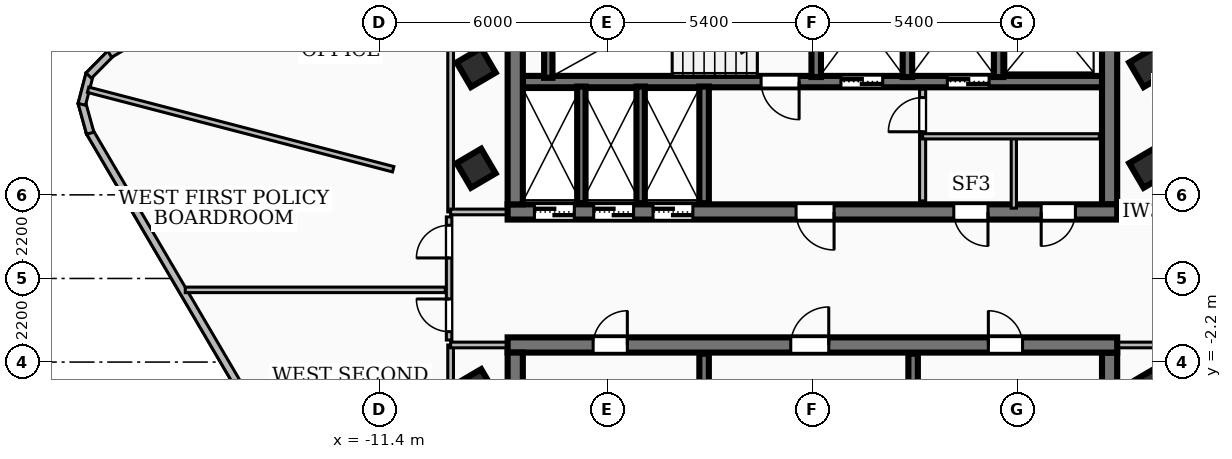
"""IFC4 building model, lengths in metres.
Left out: names, types, materials, properties, quantities, classifications, styles, units other than length and angle.
Written with IfcOpenShell. Run it as: python <this file> out.ifc"""

import sys

from ifc_helpers import new_model, si_unit, direction, frame, frame_2d, origin, origin_2d, place, context, subcontext, project, spatial, rectangle, extrude, element, fill, save


model = new_model("IFC4")
c1 = context("Model", 3, precision=1e-05, world=origin(), true_north=direction((0.0, 1.0)))
c2 = subcontext(c1, "Body", "Model", "MODEL_VIEW")
j1 = project(units=[si_unit("LENGTHUNIT", "METRE"), si_unit("PLANEANGLEUNIT", "RADIAN")], contexts=[c1])
p1 = place(None, origin())
s1 = spatial("IfcSite", under=j1, at=p1, CompositionType="ELEMENT")
p2 = place(p1, origin())
s2 = spatial("IfcBuilding", under=s1, at=p2, CompositionType="ELEMENT")
p3 = place(p2, frame((0.0, 0.0, 212.04)))
s3 = spatial("IfcBuildingStorey", under=s2, at=p3, CompositionType="ELEMENT", Elevation=212.04)
p4 = place(p3, frame((8.02, 1.75, 0.0), z_axis=(0.0, 0.0, 1.0), x_axis=(-1.0, 0.0, 0.0)))
e1 = element("IfcWall", 1, at=p4, inside=s3, PredefinedType="SHEAR", context=c2, shape_type="SweptSolid", body=[
    extrude(rectangle(XDim=16.04, YDim=0.4, at=frame_2d((8.02, 0.0))), origin(), (0.0, 0.0, 1.0), 3.16),
])
p5 = place(p4, frame((7.45, 0.0, 0.0)))
e2 = element("IfcOpeningElement", 2, at=p5, cuts=e1, PredefinedType="OPENING", context=c2, shape_type="SweptSolid", body=[
    extrude(rectangle(XDim=1.0, YDim=2.1, at=frame_2d((0.5, 1.05))), frame((0.0, 0.21, 0.0), z_axis=(0.0, -1.0, 0.0), x_axis=(1.0, 0.0, 0.0)), (0.0, 0.0, 1.0), 0.42),
])
p6 = place(p4, frame((14.285, 0.0, 0.0)))
e3 = element("IfcOpeningElement", 3, at=p6, cuts=e1, PredefinedType="OPENING", context=c2, shape_type="SweptSolid", body=[
    extrude(rectangle(XDim=1.05, YDim=2.15, at=frame_2d((0.525, 1.075))), frame((0.0, 0.21, 0.0), z_axis=(0.0, -1.0, 0.0), x_axis=(1.0, 0.0, 0.0)), (0.0, 0.0, 1.0), 0.42),
])
p7 = place(p4, frame((12.725, 0.0, 0.0)))
e4 = element("IfcOpeningElement", 4, at=p7, cuts=e1, PredefinedType="OPENING", context=c2, shape_type="SweptSolid", body=[
    extrude(rectangle(XDim=1.05, YDim=2.15, at=frame_2d((0.525, 1.075))), frame((0.0, 0.21, 0.0), z_axis=(0.0, -1.0, 0.0), x_axis=(1.0, 0.0, 0.0)), (0.0, 0.0, 1.0), 0.42),
])
p8 = place(p4, frame((11.165, 0.0, 0.0)))
e5 = element("IfcOpeningElement", 5, at=p8, cuts=e1, PredefinedType="OPENING", context=c2, shape_type="SweptSolid", body=[
    extrude(rectangle(XDim=1.05, YDim=2.15, at=frame_2d((0.525, 1.075))), frame((0.0, 0.21, 0.0), z_axis=(0.0, -1.0, 0.0), x_axis=(1.0, 0.0, 0.0)), (0.0, 0.0, 1.0), 0.42),
])
p9 = place(p4, frame((3.4, 0.0, 0.0)))
e6 = element("IfcOpeningElement", 6, at=p9, cuts=e1, PredefinedType="OPENING", context=c2, shape_type="SweptSolid", body=[
    extrude(rectangle(XDim=0.9, YDim=2.06, at=frame_2d((0.45, 1.03))), frame((0.0, 0.21, 0.0), z_axis=(0.0, -1.0, 0.0), x_axis=(1.0, 0.0, 0.0)), (0.0, 0.0, 1.0), 0.42),
])
p10 = place(p4, frame((1.1, 0.0, 0.0)))
e7 = element("IfcOpeningElement", 7, at=p10, cuts=e1, PredefinedType="OPENING", context=c2, shape_type="SweptSolid", body=[
    extrude(rectangle(XDim=0.9, YDim=2.06, at=frame_2d((0.45, 1.03))), frame((0.0, 0.21, 0.0), z_axis=(0.0, -1.0, 0.0), x_axis=(1.0, 0.0, 0.0)), (0.0, 0.0, 1.0), 0.42),
])
for number, where, z_axis, x_axis in (
    (8, (-7.82, 1.95, 0.0), (0.0, 0.0, 1.0), (0.0, 1.0, 0.0)),
    (9, (7.82, 8.31, 0.0), (0.0, 0.0, 1.0), (0.0, -1.0, 0.0)),
):
    element("IfcWall", number, at=place(p3, frame(where, z_axis=z_axis, x_axis=x_axis)), inside=s3, PredefinedType="SHEAR", context=c2, shape_type="SweptSolid", body=[
        extrude(rectangle(XDim=6.36, YDim=0.4, at=frame_2d((3.18, 0.0))), origin(), (0.0, 0.0, 1.0), 3.16),
    ])
p11 = place(p3, frame((7.62, 5.18, 0.0), z_axis=(0.0, 0.0, 1.0), x_axis=(-1.0, 0.0, 0.0)))
e10 = element("IfcWall", 10, at=p11, inside=s3, PredefinedType="SOLIDWALL", context=c2, shape_type="SweptSolid", body=[
    extrude(rectangle(XDim=15.24, YDim=0.3, at=frame_2d((7.62, 0.0))), origin(), (0.0, 0.0, 1.0), 3.16),
])
p12 = place(p11, frame((5.77, 0.0, 0.0)))
e11 = element("IfcOpeningElement", 11, at=p12, cuts=e10, PredefinedType="OPENING", context=c2, shape_type="SweptSolid", body=[
    extrude(rectangle(XDim=1.1, YDim=2.15, at=frame_2d((0.55, 1.075))), frame((0.0, 0.16, 0.0), z_axis=(0.0, -1.0, 0.0), x_axis=(1.0, 0.0, 0.0)), (0.0, 0.0, 1.0), 0.32),
])
p13 = place(p11, frame((2.97, 0.0, 0.0)))
e12 = element("IfcOpeningElement", 12, at=p13, cuts=e10, PredefinedType="OPENING", context=c2, shape_type="SweptSolid", body=[
    extrude(rectangle(XDim=1.1, YDim=2.15, at=frame_2d((0.55, 1.075))), frame((0.0, 0.16, 0.0), z_axis=(0.0, -1.0, 0.0), x_axis=(1.0, 0.0, 0.0)), (0.0, 0.0, 1.0), 0.32),
])
p14 = place(p11, frame((7.97, 0.0, 0.0)))
e13 = element("IfcOpeningElement", 13, at=p14, cuts=e10, PredefinedType="OPENING", context=c2, shape_type="SweptSolid", body=[
    extrude(rectangle(XDim=1.0, YDim=2.1, at=frame_2d((0.5, 1.05))), frame((0.0, 0.16, 0.0), z_axis=(0.0, -1.0, 0.0), x_axis=(1.0, 0.0, 0.0)), (0.0, 0.0, 1.0), 0.32),
])
p15 = place(p3, frame((-8.02, -1.75, 0.0), z_axis=(0.0, 0.0, 1.0), x_axis=(1.0, 0.0, 0.0)))
e14 = element("IfcWall", 14, at=p15, inside=s3, PredefinedType="SHEAR", context=c2, shape_type="SweptSolid", body=[
    extrude(rectangle(XDim=16.04, YDim=0.4, at=frame_2d((8.02, 0.0))), origin(), (0.0, 0.0, 1.0), 3.16),
])
p16 = place(p15, frame((7.45, 0.0, 0.0)))
e15 = element("IfcOpeningElement", 15, at=p16, cuts=e14, PredefinedType="OPENING", context=c2, shape_type="SweptSolid", body=[
    extrude(rectangle(XDim=1.0, YDim=2.1, at=frame_2d((0.5, 1.05))), frame((0.0, 0.21, 0.0), z_axis=(0.0, -1.0, 0.0), x_axis=(1.0, 0.0, 0.0)), (0.0, 0.0, 1.0), 0.42),
])
p17 = place(p15, frame((12.65, 0.0, 0.0)))
e16 = element("IfcOpeningElement", 16, at=p17, cuts=e14, PredefinedType="OPENING", context=c2, shape_type="SweptSolid", body=[
    extrude(rectangle(XDim=0.9, YDim=2.06, at=frame_2d((0.45, 1.03))), frame((0.0, 0.21, 0.0), z_axis=(0.0, -1.0, 0.0), x_axis=(1.0, 0.0, 0.0)), (0.0, 0.0, 1.0), 0.42),
])
p18 = place(p15, frame((2.25, 0.0, 0.0)))
e17 = element("IfcOpeningElement", 17, at=p18, cuts=e14, PredefinedType="OPENING", context=c2, shape_type="SweptSolid", body=[
    extrude(rectangle(XDim=0.9, YDim=2.06, at=frame_2d((0.45, 1.03))), frame((0.0, 0.21, 0.0), z_axis=(0.0, -1.0, 0.0), x_axis=(1.0, 0.0, 0.0)), (0.0, 0.0, 1.0), 0.42),
])
for number, where, z_axis, x_axis in (
    (18, (-7.82, -8.31, 0.0), (0.0, 0.0, 1.0), (0.0, 1.0, 0.0)),
    (19, (7.82, -1.95, 0.0), (0.0, 0.0, 1.0), (0.0, -1.0, 0.0)),
):
    element("IfcWall", number, at=place(p3, frame(where, z_axis=z_axis, x_axis=x_axis)), inside=s3, PredefinedType="SHEAR", context=c2, shape_type="SweptSolid", body=[
        extrude(rectangle(XDim=6.36, YDim=0.4, at=frame_2d((3.18, 0.0))), origin(), (0.0, 0.0, 1.0), 3.16),
    ])
p19 = place(p3, frame((-6.95, 5.28, 0.0), z_axis=(0.0, 0.0, 1.0), x_axis=(0.0, 1.0, 0.0)))
e20 = element("IfcWall", 20, at=p19, inside=s3, PredefinedType="SOLIDWALL", context=c2, shape_type="SweptSolid", body=[
    extrude(rectangle(XDim=3.06, YDim=0.22, at=frame_2d((1.53, 0.0))), origin(), (0.0, 0.0, 1.0), 3.16),
])
for number, where, z_axis, x_axis in (
    (21, (0.1, 5.3, 0.0), (0.0, 0.0, 1.0), (0.0, 1.0, 0.0)),
    (22, (2.5, 5.3, 0.0), (0.0, 0.0, 1.0), (0.0, 1.0, 0.0)),
    (23, (4.9, 5.3, 0.0), (0.0, 0.0, 1.0), (0.0, 1.0, 0.0)),
):
    element("IfcWall", number, at=place(p3, frame(where, z_axis=z_axis, x_axis=x_axis)), inside=s3, PredefinedType="SOLIDWALL", context=c2, shape_type="SweptSolid", body=[
        extrude(rectangle(XDim=3.04, YDim=0.25, at=frame_2d((1.52, 0.0))), origin(), (0.0, 0.0, 1.0), 3.16),
    ])
for number, where, z_axis, x_axis in (
    (24, (-2.85, 1.98, 0.0), (0.0, 0.0, 1.0), (0.0, 1.0, 0.0)),
    (25, (-2.85, -5.05, 0.0), (0.0, 0.0, 1.0), (0.0, 1.0, 0.0)),
    (26, (2.65, -5.05, 0.0), (0.0, 0.0, 1.0), (0.0, 1.0, 0.0)),
):
    element("IfcWall", number, at=place(p3, frame(where, z_axis=z_axis, x_axis=x_axis)), inside=s3, PredefinedType="SOLIDWALL", context=c2, shape_type="SweptSolid", body=[
        extrude(rectangle(XDim=3.07, YDim=0.25, at=frame_2d((1.535, 0.0))), origin(), (0.0, 0.0, 1.0), 3.16),
    ])
for number, where, z_axis, x_axis in (
    (27, (-6.08, 1.98, 0.0), (0.0, 0.0, 1.0), (0.0, 1.0, 0.0)),
    (28, (-4.52, 1.98, 0.0), (0.0, 0.0, 1.0), (0.0, 1.0, 0.0)),
):
    element("IfcWall", number, at=place(p3, frame(where, z_axis=z_axis, x_axis=x_axis)), inside=s3, PredefinedType="SOLIDWALL", context=c2, shape_type="SweptSolid", body=[
        extrude(rectangle(XDim=3.07, YDim=0.22, at=frame_2d((1.535, 0.0))), origin(), (0.0, 0.0, 1.0), 3.16),
    ])
for number, where, z_axis, x_axis in (
    (29, (-8.85, -2.9, 0.0), (0.0, 0.0, 1.0), (0.863, 0.506, 0.0)),
    (30, (-8.85, 2.9, 0.0), (0.0, 0.0, 1.0), (0.863, 0.506, 0.0)),
    (31, (-8.85, 5.55, 0.0), (0.0, 0.0, 1.0), (0.863, 0.506, 0.0)),
    (32, (8.85, -2.9, 0.0), (0.0, 0.0, 1.0), (0.863, 0.506, 0.0)),
    (33, (8.85, 2.9, 0.0), (0.0, 0.0, 1.0), (0.863, 0.506, 0.0)),
    (34, (8.85, 5.55, 0.0), (0.0, 0.0, 1.0), (0.863, 0.506, 0.0)),
):
    element("IfcColumn", number, at=place(p3, frame(where, z_axis=z_axis, x_axis=x_axis)), inside=s3, PredefinedType="COLUMN", context=c2, shape_type="SweptSolid", body=[
        extrude(rectangle(XDim=0.75, YDim=0.75, at=origin_2d()), origin(), (0.0, 0.0, 1.0), 3.42),
    ])
p20 = place(p3, frame((-5.904, -18.492, 0.0), z_axis=(0.0, 0.0, 1.0), x_axis=(-0.506046465446, 0.862506217258, 0.0)))
e35 = element("IfcWall", 35, at=p20, inside=s3, PredefinedType="SOLIDWALL", context=c2, shape_type="SweptSolid", body=[
    extrude(rectangle(XDim=25.924, YDim=0.2, at=frame_2d((12.962, 0.0))), origin(), (0.0, 0.0, 1.0), 3.16),
])
p21 = place(p20, frame((0.85, 0.0, 0.85)))
e36 = element("IfcOpeningElement", 36, at=p21, cuts=e35, PredefinedType="OPENING", context=c2, shape_type="SweptSolid", body=[
    extrude(rectangle(XDim=2.4, YDim=1.85, at=frame_2d((1.2, 0.925))), frame((0.0, 0.11, 0.0), z_axis=(0.0, -1.0, 0.0), x_axis=(1.0, 0.0, 0.0)), (0.0, 0.0, 1.0), 0.22),
])
p22 = place(p3, frame((-19.003, 3.822, 0.0), z_axis=(0.0, 0.0, 1.0), x_axis=(-0.266246353668, 0.963905015631, 0.0)))
e37 = element("IfcWall", 37, at=p22, inside=s3, PredefinedType="SOLIDWALL", context=c2, shape_type="SweptSolid", body=[
    extrude(rectangle(XDim=0.838, YDim=0.2, at=frame_2d((0.419, 0.0))), origin(), (0.0, 0.0, 1.0), 3.16),
])
p23 = place(p3, frame((-19.225, 4.582, 0.0), z_axis=(0.0, 0.0, 1.0), x_axis=(0.251167733737, 0.967943577658, 0.0)))
e38 = element("IfcWall", 38, at=p23, inside=s3, PredefinedType="SOLIDWALL", context=c2, shape_type="SweptSolid", body=[
    extrude(rectangle(XDim=0.824, YDim=0.2, at=frame_2d((0.412, 0.0))), origin(), (0.0, 0.0, 1.0), 3.16),
])
p24 = place(p3, frame((-19.042, 5.338, 0.0), z_axis=(0.0, 0.0, 1.0), x_axis=(0.702877524881, 0.711310891957, 0.0)))
e39 = element("IfcWall", 39, at=p24, inside=s3, PredefinedType="SOLIDWALL", context=c2, shape_type="SweptSolid", body=[
    extrude(rectangle(XDim=0.84, YDim=0.2, at=frame_2d((0.42, 0.0))), origin(), (0.0, 0.0, 1.0), 3.16),
])
p25 = place(p3, frame((-18.492, 5.904, 0.0), z_axis=(0.0, 0.0, 1.0), x_axis=(0.86245977502, 0.506125613333, 0.0)))
e40 = element("IfcWall", 40, at=p25, inside=s3, PredefinedType="SOLIDWALL", context=c2, shape_type="SweptSolid", body=[
    extrude(rectangle(XDim=6.741, YDim=0.2, at=frame_2d((3.371, 0.0))), origin(), (0.0, 0.0, 1.0), 3.16),
])
p26 = place(p3, frame((2.9, 2.04, 0.0), z_axis=(0.0, 0.0, 1.0), x_axis=(0.0, 1.0, 0.0)))
e41 = element("IfcWall", 41, at=p26, inside=s3, PredefinedType="PARTITIONING", context=c2, shape_type="SweptSolid", body=[
    extrude(rectangle(XDim=2.94, YDim=0.16, at=frame_2d((1.47, 0.0))), origin(), (0.0, 0.0, 1.0), 2.39),
])
p27 = place(p26, frame((1.82, 0.0, 0.0)))
e42 = element("IfcOpeningElement", 42, at=p27, cuts=e41, PredefinedType="OPENING", context=c2, shape_type="SweptSolid", body=[
    extrude(rectangle(XDim=0.9, YDim=2.06, at=frame_2d((0.45, 1.03))), frame((0.0, 0.09, 0.0), z_axis=(0.0, -1.0, 0.0), x_axis=(1.0, 0.0, 0.0)), (0.0, 0.0, 1.0), 0.18),
])
p28 = place(p3, frame((2.9, 3.74, 0.0), z_axis=(0.0, 0.0, 1.0), x_axis=(1.0, 0.0, 0.0)))
e43 = element("IfcWall", 43, at=p28, inside=s3, PredefinedType="PARTITIONING", context=c2, shape_type="SweptSolid", body=[
    extrude(rectangle(XDim=4.65, YDim=0.138, at=frame_2d((2.325, 0.0))), origin(), (0.0, 0.0, 1.0), 3.16),
])
p29 = place(p3, frame((5.3, 1.85, 0.0), z_axis=(0.0, 0.0, 1.0), x_axis=(0.0, 1.0, 0.0)))
e44 = element("IfcWall", 44, at=p29, inside=s3, PredefinedType="PARTITIONING", context=c2, shape_type="SweptSolid", body=[
    extrude(rectangle(XDim=1.89, YDim=0.138, at=frame_2d((0.945, 0.0))), origin(), (0.0, 0.0, 1.0), 2.39),
])
p30 = place(p3, frame((-9.52, 1.75, 0.0), z_axis=(0.0, 0.0, 1.0), x_axis=(0.0, 1.0, 0.0)))
e45 = element("IfcWall", 45, at=p30, inside=s3, PredefinedType="PARTITIONING", context=c2, shape_type="SweptSolid", body=[
    extrude(rectangle(XDim=6.63, YDim=0.15, at=frame_2d((3.315, 0.0))), origin(), (0.0, 0.0, 1.0), 3.16),
])
p31 = place(p3, frame((-7.85, 1.75, 0.0), z_axis=(0.0, 0.0, 1.0), x_axis=(-1.0, 0.0, 0.0)))
e46 = element("IfcWall", 46, at=p31, inside=s3, PredefinedType="PARTITIONING", context=c2, shape_type="SweptSolid", body=[
    extrude(rectangle(XDim=1.67, YDim=0.15, at=frame_2d((0.835, 0.0))), origin(), (0.0, 0.0, 1.0), 2.39),
])
p32 = place(p3, frame((-9.52, -8.38, 0.0), z_axis=(0.0, 0.0, 1.0), x_axis=(0.0, 1.0, 0.0)))
e47 = element("IfcWall", 47, at=p32, inside=s3, PredefinedType="PARTITIONING", context=c2, shape_type="SweptSolid", body=[
    extrude(rectangle(XDim=6.63, YDim=0.15, at=frame_2d((3.315, 0.0))), origin(), (0.0, 0.0, 1.0), 3.16),
])
for number, where, z_axis, x_axis in (
    (48, (-7.85, -1.75, 0.0), (0.0, 0.0, 1.0), (-1.0, 0.0, 0.0)),
    (49, (7.85, 1.75, 0.0), (0.0, 0.0, 1.0), (1.0, 0.0, 0.0)),
    (50, (7.85, -1.75, 0.0), (0.0, 0.0, 1.0), (1.0, 0.0, 0.0)),
):
    element("IfcWall", number, at=place(p3, frame(where, z_axis=z_axis, x_axis=x_axis)), inside=s3, PredefinedType="PARTITIONING", context=c2, shape_type="SweptSolid", body=[
        extrude(rectangle(XDim=1.67, YDim=0.15, at=frame_2d((0.835, 0.0))), origin(), (0.0, 0.0, 1.0), 2.39),
    ])
p33 = place(p3, frame((-16.502, -0.3, 0.0), z_axis=(0.0, 0.0, 1.0), x_axis=(1.0, 0.0, 0.0)))
e51 = element("IfcWall", 51, at=p33, inside=s3, PredefinedType="PARTITIONING", context=c2, shape_type="SweptSolid", body=[
    extrude(rectangle(XDim=6.842, YDim=0.145, at=frame_2d((3.421, 0.0))), origin(), (0.0, 0.0, 1.0), 3.16),
])
p34 = place(p3, frame((-9.56, -1.62, 0.0), z_axis=(0.0, 0.0, 1.0), x_axis=(0.0, 1.0, 0.0)))
e52 = element("IfcWall", 52, at=p34, inside=s3, PredefinedType="PARTITIONING", context=c2, shape_type="SweptSolid", body=[
    extrude(rectangle(XDim=3.24, YDim=0.145, at=frame_2d((1.62, 0.0))), origin(), (0.0, 0.0, 1.0), 3.16),
])
p35 = place(p34, frame((0.22, 0.0, 0.0)))
e53 = element("IfcOpeningElement", 53, at=p35, cuts=e52, PredefinedType="OPENING", context=c2, shape_type="SweptSolid", body=[
    extrude(rectangle(XDim=0.86, YDim=2.04, at=frame_2d((0.43, 1.02))), frame((0.0, 0.083, 0.0), z_axis=(0.0, -1.0, 0.0), x_axis=(1.0, 0.0, 0.0)), (0.0, 0.0, 1.0), 0.165),
])
p36 = place(p34, frame((2.16, 0.0, 0.0)))
e54 = element("IfcOpeningElement", 54, at=p36, cuts=e52, PredefinedType="OPENING", context=c2, shape_type="SweptSolid", body=[
    extrude(rectangle(XDim=0.86, YDim=2.04, at=frame_2d((0.43, 1.02))), frame((0.0, 0.083, 0.0), z_axis=(0.0, -1.0, 0.0), x_axis=(1.0, 0.0, 0.0)), (0.0, 0.0, 1.0), 0.165),
])
p37 = place(p3, frame((-11.032, 2.874, 0.0), z_axis=(0.0, 0.0, 1.0), x_axis=(-0.967704417597, 0.252087604146, 0.0)))
e55 = element("IfcWall", 55, at=p37, inside=s3, PredefinedType="PARTITIONING", context=c2, shape_type="SweptSolid", body=[
    extrude(rectangle(XDim=8.295, YDim=0.145, at=frame_2d((4.147, 0.0))), origin(), (0.0, 0.0, 1.0), 3.16),
])
p38 = place(p5, origin())
e56 = element("IfcDoor", 56, at=p38, inside=s3, OperationType="SINGLE_SWING_LEFT", PredefinedType="DOOR", context=c2, shape_type="SweptSolid", body=[
    extrude(rectangle(XDim=1.0, YDim=2.1, at=frame_2d((0.5, 1.05))), frame((0.0, 0.025, 0.0), z_axis=(0.0, -1.0, 0.0), x_axis=(1.0, 0.0, 0.0)), (0.0, 0.0, 1.0), 0.05),
])
fill(e2, e56)
p39 = place(p16, origin())
e57 = element("IfcDoor", 57, at=p39, inside=s3, OperationType="SINGLE_SWING_RIGHT", PredefinedType="DOOR", context=c2, shape_type="SweptSolid", body=[
    extrude(rectangle(XDim=1.0, YDim=2.1, at=frame_2d((0.5, 1.05))), frame((0.0, 0.025, 0.0), z_axis=(0.0, -1.0, 0.0), x_axis=(1.0, 0.0, 0.0)), (0.0, 0.0, 1.0), 0.05),
])
fill(e15, e57)
p40 = place(p12, origin())
e58 = element("IfcDoor", 58, at=p40, inside=s3, OperationType="DOUBLE_DOOR_SLIDING", PredefinedType="DOOR", context=c2, shape_type="SweptSolid", body=[
    extrude(rectangle(XDim=1.1, YDim=2.15, at=frame_2d((0.55, 1.075))), frame((0.0, 0.025, 0.0), z_axis=(0.0, -1.0, 0.0), x_axis=(1.0, 0.0, 0.0)), (0.0, 0.0, 1.0), 0.05),
])
fill(e11, e58)
p41 = place(p13, origin())
e59 = element("IfcDoor", 59, at=p41, inside=s3, OperationType="DOUBLE_DOOR_SLIDING", PredefinedType="DOOR", context=c2, shape_type="SweptSolid", body=[
    extrude(rectangle(XDim=1.1, YDim=2.15, at=frame_2d((0.55, 1.075))), frame((0.0, 0.025, 0.0), z_axis=(0.0, -1.0, 0.0), x_axis=(1.0, 0.0, 0.0)), (0.0, 0.0, 1.0), 0.05),
])
fill(e12, e59)
p42 = place(p14, origin())
e60 = element("IfcDoor", 60, at=p42, inside=s3, OperationType="SINGLE_SWING_LEFT", PredefinedType="DOOR", context=c2, shape_type="SweptSolid", body=[
    extrude(rectangle(XDim=1.0, YDim=2.1, at=frame_2d((0.5, 1.05))), frame((0.0, 0.025, 0.0), z_axis=(0.0, -1.0, 0.0), x_axis=(1.0, 0.0, 0.0)), (0.0, 0.0, 1.0), 0.05),
])
fill(e13, e60)
p43 = place(p6, origin())
e61 = element("IfcDoor", 61, at=p43, inside=s3, OperationType="DOUBLE_DOOR_SLIDING", PredefinedType="DOOR", context=c2, shape_type="SweptSolid", body=[
    extrude(rectangle(XDim=1.05, YDim=2.15, at=frame_2d((0.525, 1.075))), frame((0.0, 0.025, 0.0), z_axis=(0.0, -1.0, 0.0), x_axis=(1.0, 0.0, 0.0)), (0.0, 0.0, 1.0), 0.05),
])
fill(e3, e61)
p44 = place(p7, origin())
e62 = element("IfcDoor", 62, at=p44, inside=s3, OperationType="DOUBLE_DOOR_SLIDING", PredefinedType="DOOR", context=c2, shape_type="SweptSolid", body=[
    extrude(rectangle(XDim=1.05, YDim=2.15, at=frame_2d((0.525, 1.075))), frame((0.0, 0.025, 0.0), z_axis=(0.0, -1.0, 0.0), x_axis=(1.0, 0.0, 0.0)), (0.0, 0.0, 1.0), 0.05),
])
fill(e4, e62)
p45 = place(p8, origin())
e63 = element("IfcDoor", 63, at=p45, inside=s3, OperationType="DOUBLE_DOOR_SLIDING", PredefinedType="DOOR", context=c2, shape_type="SweptSolid", body=[
    extrude(rectangle(XDim=1.05, YDim=2.15, at=frame_2d((0.525, 1.075))), frame((0.0, 0.025, 0.0), z_axis=(0.0, -1.0, 0.0), x_axis=(1.0, 0.0, 0.0)), (0.0, 0.0, 1.0), 0.05),
])
fill(e5, e63)
p46 = place(p17, origin())
e64 = element("IfcDoor", 64, at=p46, inside=s3, OperationType="SINGLE_SWING_LEFT", PredefinedType="DOOR", context=c2, shape_type="SweptSolid", body=[
    extrude(rectangle(XDim=0.9, YDim=2.06, at=frame_2d((0.45, 1.03))), frame((0.0, 0.025, 0.0), z_axis=(0.0, -1.0, 0.0), x_axis=(1.0, 0.0, 0.0)), (0.0, 0.0, 1.0), 0.05),
])
fill(e16, e64)
p47 = place(p18, origin())
e65 = element("IfcDoor", 65, at=p47, inside=s3, OperationType="SINGLE_SWING_RIGHT", PredefinedType="DOOR", context=c2, shape_type="SweptSolid", body=[
    extrude(rectangle(XDim=0.9, YDim=2.06, at=frame_2d((0.45, 1.03))), frame((0.0, 0.025, 0.0), z_axis=(0.0, -1.0, 0.0), x_axis=(1.0, 0.0, 0.0)), (0.0, 0.0, 1.0), 0.05),
])
fill(e17, e65)
p48 = place(p9, origin())
e66 = element("IfcDoor", 66, at=p48, inside=s3, OperationType="SINGLE_SWING_LEFT", PredefinedType="DOOR", context=c2, shape_type="SweptSolid", body=[
    extrude(rectangle(XDim=0.9, YDim=2.06, at=frame_2d((0.45, 1.03))), frame((0.0, 0.025, 0.0), z_axis=(0.0, -1.0, 0.0), x_axis=(1.0, 0.0, 0.0)), (0.0, 0.0, 1.0), 0.05),
])
fill(e6, e66)
p49 = place(p10, origin())
e67 = element("IfcDoor", 67, at=p49, inside=s3, OperationType="SINGLE_SWING_RIGHT", PredefinedType="DOOR", context=c2, shape_type="SweptSolid", body=[
    extrude(rectangle(XDim=0.9, YDim=2.06, at=frame_2d((0.45, 1.03))), frame((0.0, 0.025, 0.0), z_axis=(0.0, -1.0, 0.0), x_axis=(1.0, 0.0, 0.0)), (0.0, 0.0, 1.0), 0.05),
])
fill(e7, e67)
p50 = place(p27, origin())
e68 = element("IfcDoor", 68, at=p50, inside=s3, OperationType="SINGLE_SWING_LEFT", PredefinedType="DOOR", context=c2, shape_type="SweptSolid", body=[
    extrude(rectangle(XDim=0.9, YDim=2.06, at=frame_2d((0.45, 1.03))), frame((0.0, 0.025, 0.0), z_axis=(0.0, -1.0, 0.0), x_axis=(1.0, 0.0, 0.0)), (0.0, 0.0, 1.0), 0.05),
])
fill(e42, e68)
p51 = place(p35, origin())
e69 = element("IfcDoor", 69, at=p51, inside=s3, OperationType="SINGLE_SWING_RIGHT", PredefinedType="DOOR", context=c2, shape_type="SweptSolid", body=[
    extrude(rectangle(XDim=0.86, YDim=2.04, at=frame_2d((0.43, 1.02))), frame((0.0, 0.025, 0.0), z_axis=(0.0, -1.0, 0.0), x_axis=(1.0, 0.0, 0.0)), (0.0, 0.0, 1.0), 0.05),
])
fill(e53, e69)
p52 = place(p36, origin())
e70 = element("IfcDoor", 70, at=p52, inside=s3, OperationType="SINGLE_SWING_LEFT", PredefinedType="DOOR", context=c2, shape_type="SweptSolid", body=[
    extrude(rectangle(XDim=0.86, YDim=2.04, at=frame_2d((0.43, 1.02))), frame((0.0, 0.025, 0.0), z_axis=(0.0, -1.0, 0.0), x_axis=(1.0, 0.0, 0.0)), (0.0, 0.0, 1.0), 0.05),
])
fill(e54, e70)
save(model, sys.argv[1])
